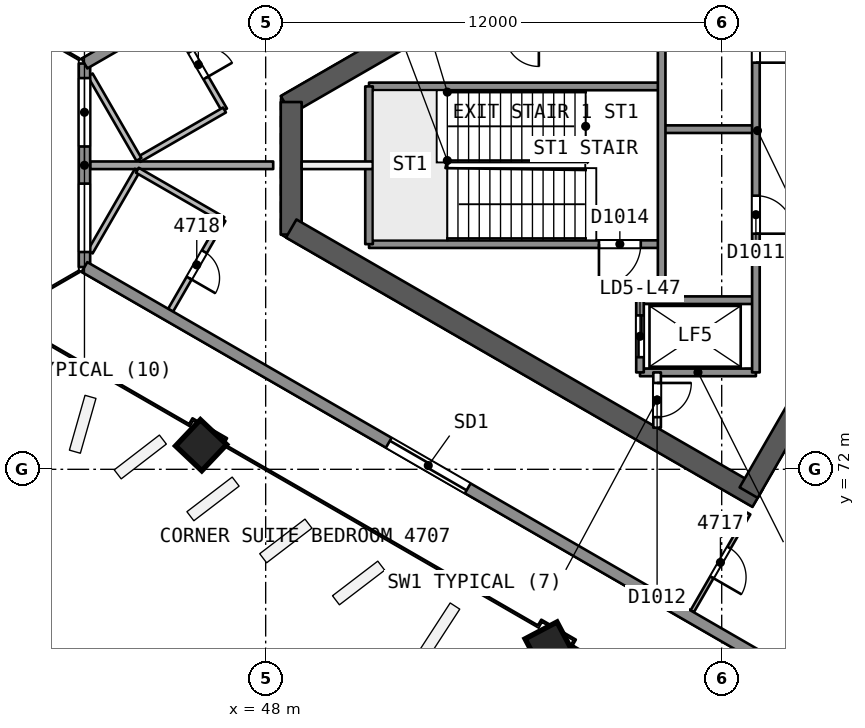
"""IFC4 building model, lengths in metres.
Left out: names, types, materials, properties, quantities, classifications, styles, units other than length and angle.
Written with IfcOpenShell. Run it as: python <this file> out.ifc"""

import sys

from ifc_helpers import new_model, si_unit, direction, frame, frame_2d, origin, origin_2d, place, context, subcontext, project, spatial, rectangle, extrude, element, fill, save


model = new_model("IFC4")
c1 = context("Model", 3, precision=1e-05, world=origin(), true_north=direction((0.0, 1.0)))
c2 = subcontext(c1, "Body", "Model", "MODEL_VIEW")
j1 = project(units=[si_unit("LENGTHUNIT", "METRE"), si_unit("PLANEANGLEUNIT", "RADIAN")], contexts=[c1])
p1 = place(None, origin())
s1 = spatial("IfcSite", under=j1, at=p1, CompositionType="ELEMENT")
p2 = place(p1, origin())
s2 = spatial("IfcBuilding", under=s1, at=p2, CompositionType="ELEMENT")
p3 = place(p2, frame((0.0, 0.0, 193.3)))
s3 = spatial("IfcBuildingStorey", under=s2, at=p3, CompositionType="ELEMENT", Elevation=193.3)
p4 = place(p3, frame((65.682, 80.0, 0.0), z_axis=(0.0, 0.0, 1.0), x_axis=(-0.500000202252, 0.866025287014, 0.0)))
e1 = element("IfcWall", 1, at=p4, inside=s3, PredefinedType="SHEAR", context=c2, shape_type="SweptSolid", body=[
    extrude(rectangle(XDim=10.221, YDim=0.55, at=frame_2d((5.111, 0.0))), origin(), (0.0, 0.0, 1.0), 3.7),
])
p5 = place(p4, frame((0.791, 0.0, 0.0)))
e2 = element("IfcOpeningElement", 2, at=p5, cuts=e1, PredefinedType="OPENING", context=c2, shape_type="SweptSolid", body=[
    extrude(rectangle(XDim=1.2, YDim=2.1, at=frame_2d((0.6, 1.05))), frame((0.0, 0.286, 0.0), z_axis=(0.0, -1.0, 0.0), x_axis=(1.0, 0.0, 0.0)), (0.0, 0.0, 1.0), 0.571),
])
p6 = place(p3, frame((60.709, 88.614, 0.0), z_axis=(0.0, 0.0, 1.0), x_axis=(-0.866020164116, -0.500009075263, 0.0)))
e3 = element("IfcWall", 3, at=p6, inside=s3, PredefinedType="SHEAR", context=c2, shape_type="SweptSolid", body=[
    extrude(rectangle(XDim=14.058, YDim=0.55, at=frame_2d((7.029, 0.0))), origin(), (0.0, 0.0, 1.0), 3.7),
])
p7 = place(p3, frame((48.672, 81.664, 0.0), z_axis=(0.0, 0.0, 1.0), x_axis=(0.0, -1.0, 0.0)))
e4 = element("IfcWall", 4, at=p7, inside=s3, PredefinedType="SHEAR", context=c2, shape_type="SweptSolid", body=[
    extrude(rectangle(XDim=3.487, YDim=0.55, at=frame_2d((1.743, 0.0))), origin(), (0.0, 0.0, 1.0), 3.7),
])
p8 = place(p3, frame((48.672, 78.336, 0.0), z_axis=(0.0, 0.0, 1.0), x_axis=(0.866023530946, -0.500003243837, 0.0)))
e5 = element("IfcWall", 5, at=p8, inside=s3, PredefinedType="SHEAR", context=c2, shape_type="SweptSolid", body=[
    extrude(rectangle(XDim=14.175, YDim=0.55, at=frame_2d((7.087, 0.0))), origin(), (0.0, 0.0, 1.0), 3.7),
])
p9 = place(p3, frame((60.709, 71.386, 0.0), z_axis=(0.0, 0.0, 1.0), x_axis=(0.500015938302, 0.866016201606, 0.0)))
e6 = element("IfcWall", 6, at=p9, inside=s3, PredefinedType="SHEAR", context=c2, shape_type="SweptSolid", body=[
    extrude(rectangle(XDim=10.105, YDim=0.55, at=frame_2d((5.053, 0.0))), origin(), (0.0, 0.0, 1.0), 3.7),
])
p10 = place(p9, frame((7.955, 0.0, 0.0)))
e7 = element("IfcOpeningElement", 7, at=p10, cuts=e6, PredefinedType="OPENING", context=c2, shape_type="SweptSolid", body=[
    extrude(rectangle(XDim=1.2, YDim=2.1, at=frame_2d((0.6, 1.05))), frame((0.0, 0.286, 0.0), z_axis=(0.0, -1.0, 0.0), x_axis=(1.0, 0.0, 0.0)), (0.0, 0.0, 1.0), 0.571),
])
p11 = place(p3, frame((46.266, 72.626, 0.0), z_axis=(0.02855911485, 0.006793507689, 0.999569019734), x_axis=(-0.865318766308, 0.500768301983, 0.021319953197)))
e8 = element("IfcColumn", 8, at=p11, inside=s3, PredefinedType="COLUMN", context=c2, shape_type="SweptSolid", body=[
    extrude(rectangle(XDim=0.95, YDim=0.95, at=origin_2d()), origin(), (0.0, 0.0, 1.0), 3.702),
])
p12 = place(p3, frame((55.445, 67.326, 0.0), z_axis=(0.019328501455, 0.012204002625, 0.999738701537), x_axis=(-0.866906106124, 0.498357109285, 0.010676834304)))
e9 = element("IfcColumn", 9, at=p12, inside=s3, PredefinedType="COLUMN", context=c2, shape_type="SweptSolid", body=[
    extrude(rectangle(XDim=0.95, YDim=0.95, at=origin_2d()), origin(), (0.0, 0.0, 1.0), 3.701),
])
p13 = place(p3, frame((45.54, 83.838, 0.0), z_axis=(0.0, 0.0, 1.0), x_axis=(0.499983500429, -0.866034929606, 0.0)))
e10 = element("IfcWall", 10, at=p13, inside=s3, PredefinedType="PARTITIONING", context=c2, shape_type="SweptSolid", body=[
    extrude(rectangle(XDim=2.752, YDim=0.15, at=frame_2d((1.376, 0.0))), origin(), (0.0, 0.0, 1.0), 3.3),
])
p14 = place(p13, frame((0.976, 0.0, 0.0)))
e11 = element("IfcOpeningElement", 11, at=p14, cuts=e10, PredefinedType="OPENING", context=c2, shape_type="SweptSolid", body=[
    extrude(rectangle(XDim=0.8, YDim=2.1, at=frame_2d((0.4, 1.05))), frame((0.0, 0.085, 0.0), z_axis=(0.0, -1.0, 0.0), x_axis=(1.0, 0.0, 0.0)), (0.0, 0.0, 1.0), 0.171),
])
p15 = place(p3, frame((46.916, 81.454, 0.0), z_axis=(0.0, 0.0, 1.0), x_axis=(-0.866021400173, -0.500006934395, 0.0)))
e12 = element("IfcWall", 12, at=p15, inside=s3, PredefinedType="PARTITIONING", context=c2, shape_type="SweptSolid", body=[
    extrude(rectangle(XDim=2.6, YDim=0.15, at=frame_2d((1.3, 0.0))), origin(), (0.0, 0.0, 1.0), 3.3),
])
p16 = place(p3, frame((44.664, 80.154, 0.0), z_axis=(0.0, 0.0, 1.0), x_axis=(-0.49996389635, 0.866046247233, 0.0)))
e13 = element("IfcWall", 13, at=p16, inside=s3, PredefinedType="PARTITIONING", context=c2, shape_type="SweptSolid", body=[
    extrude(rectangle(XDim=2.568, YDim=0.15, at=frame_2d((1.284, 0.0))), origin(), (0.0, 0.0, 1.0), 3.3),
])
p17 = place(p3, frame((43.381, 80.0, 0.0), z_axis=(0.0, 0.0, 1.0), x_axis=(1.0, 0.0, 0.0)))
e14 = element("IfcWall", 14, at=p17, inside=s3, PredefinedType="PARTITIONING", context=c2, shape_type="SweptSolid", body=[
    extrude(rectangle(XDim=4.817, YDim=0.2, at=frame_2d((2.409, 0.0))), origin(), (0.0, 0.0, 1.0), 3.3),
])
p18 = place(p3, frame((60.71, 70.838, 0.0), z_axis=(0.0, 0.0, 1.0), x_axis=(-0.49997816789, -0.866038008192, 0.0)))
e15 = element("IfcWall", 15, at=p18, inside=s3, PredefinedType="PARTITIONING", context=c2, shape_type="SweptSolid", body=[
    extrude(rectangle(XDim=2.975, YDim=0.1, at=frame_2d((1.488, 0.0))), origin(), (0.0, 0.0, 1.0), 3.3),
])
p19 = place(p18, frame((1.038, 0.0, 0.0)))
e16 = element("IfcOpeningElement", 16, at=p19, cuts=e15, PredefinedType="OPENING", context=c2, shape_type="SweptSolid", body=[
    extrude(rectangle(XDim=0.9, YDim=2.1, at=frame_2d((0.45, 1.05))), frame((0.0, 0.061, 0.0), z_axis=(0.0, -1.0, 0.0), x_axis=(1.0, 0.0, 0.0)), (0.0, 0.0, 1.0), 0.121),
])
p20 = place(p3, frame((43.381, 77.718, 0.0), z_axis=(0.0, 0.0, 1.0), x_axis=(0.499943602543, 0.866057962423, 0.0)))
e17 = element("IfcWall", 17, at=p20, inside=s3, PredefinedType="PARTITIONING", context=c2, shape_type="SweptSolid", body=[
    extrude(rectangle(XDim=2.485, YDim=0.15, at=frame_2d((1.242, 0.0))), origin(), (0.0, 0.0, 1.0), 3.3),
])
p21 = place(p3, frame((44.623, 79.87, 0.0), z_axis=(0.0, 0.0, 1.0), x_axis=(0.866021400173, -0.500006934395, 0.0)))
e18 = element("IfcWall", 18, at=p21, inside=s3, PredefinedType="PARTITIONING", context=c2, shape_type="SweptSolid", body=[
    extrude(rectangle(XDim=2.6, YDim=0.15, at=frame_2d((1.3, 0.0))), origin(), (0.0, 0.0, 1.0), 3.3),
])
p22 = place(p3, frame((46.875, 78.57, 0.0), z_axis=(0.0, 0.0, 1.0), x_axis=(-0.499983500429, -0.866034929606, 0.0)))
e19 = element("IfcWall", 19, at=p22, inside=s3, PredefinedType="PARTITIONING", context=c2, shape_type="SweptSolid", body=[
    extrude(rectangle(XDim=2.752, YDim=0.15, at=frame_2d((1.376, 0.0))), origin(), (0.0, 0.0, 1.0), 3.3),
])
p23 = place(p22, frame((0.976, 0.0, 0.0)))
e20 = element("IfcOpeningElement", 20, at=p23, cuts=e19, PredefinedType="OPENING", context=c2, shape_type="SweptSolid", body=[
    extrude(rectangle(XDim=0.8, YDim=2.1, at=frame_2d((0.4, 1.05))), frame((0.0, 0.085, 0.0), z_axis=(0.0, -1.0, 0.0), x_axis=(1.0, 0.0, 0.0)), (0.0, 0.0, 1.0), 0.171),
])
p24 = place(p3, frame((43.232, 77.322, 0.0), z_axis=(0.0, 0.0, 1.0), x_axis=(0.0, 1.0, 0.0)))
e21 = element("IfcWall", 21, at=p24, inside=s3, PredefinedType="SOLIDWALL", context=c2, shape_type="SweptSolid", body=[
    extrude(rectangle(XDim=5.355, YDim=0.3, at=frame_2d((2.678, 0.0))), origin(), (0.0, 0.0, 1.0), 3.3),
])
p25 = place(p24, frame((3.172, 0.0, 0.9)))
e22 = element("IfcOpeningElement", 22, at=p25, cuts=e21, PredefinedType="OPENING", context=c2, shape_type="SweptSolid", body=[
    extrude(rectangle(XDim=1.8, YDim=1.5, at=frame_2d((0.9, 0.75))), frame((0.0, 0.161, 0.0), z_axis=(0.0, -1.0, 0.0), x_axis=(1.0, 0.0, 0.0)), (0.0, 0.0, 1.0), 0.321),
])
p26 = place(p24, frame((0.395, 0.0, 0.9)))
e23 = element("IfcOpeningElement", 23, at=p26, cuts=e21, PredefinedType="OPENING", context=c2, shape_type="SweptSolid", body=[
    extrude(rectangle(XDim=1.8, YDim=1.5, at=frame_2d((0.9, 0.75))), frame((0.0, 0.161, 0.0), z_axis=(0.0, -1.0, 0.0), x_axis=(1.0, 0.0, 0.0)), (0.0, 0.0, 1.0), 0.321),
])
p27 = place(p3, frame((43.232, 82.678, 0.0), z_axis=(0.0, 0.0, 1.0), x_axis=(0.866025125259, 0.500000482419, 0.0)))
e24 = element("IfcWall", 24, at=p27, inside=s3, PredefinedType="SOLIDWALL", context=c2, shape_type="SweptSolid", body=[
    extrude(rectangle(XDim=52.347, YDim=0.3, at=frame_2d((26.173, 0.0))), origin(), (0.0, 0.0, 1.0), 3.3),
])
p28 = place(p27, frame((31.209, 0.0, 0.0)))
e25 = element("IfcOpeningElement", 25, at=p28, cuts=e24, PredefinedType="OPENING", context=c2, shape_type="SweptSolid", body=[
    extrude(rectangle(XDim=2.4, YDim=2.4, at=frame_2d((1.2, 1.2))), frame((0.0, 0.161, 0.0), z_axis=(0.0, -1.0, 0.0), x_axis=(1.0, 0.0, 0.0)), (0.0, 0.0, 1.0), 0.321),
])
p29 = place(p27, frame((40.7, 0.0, 0.0)))
e26 = element("IfcOpeningElement", 26, at=p29, cuts=e24, PredefinedType="OPENING", context=c2, shape_type="SweptSolid", body=[
    extrude(rectangle(XDim=2.4, YDim=2.4, at=frame_2d((1.2, 1.2))), frame((0.0, 0.161, 0.0), z_axis=(0.0, -1.0, 0.0), x_axis=(1.0, 0.0, 0.0)), (0.0, 0.0, 1.0), 0.321),
])
p30 = place(p27, frame((19.517, 0.0, 0.0)))
e27 = element("IfcOpeningElement", 27, at=p30, cuts=e24, PredefinedType="OPENING", context=c2, shape_type="SweptSolid", body=[
    extrude(rectangle(XDim=2.4, YDim=2.4, at=frame_2d((1.2, 1.2))), frame((0.0, 0.161, 0.0), z_axis=(0.0, -1.0, 0.0), x_axis=(1.0, 0.0, 0.0)), (0.0, 0.0, 1.0), 0.321),
])
p31 = place(p27, frame((9.27, 0.0, 0.0)))
e28 = element("IfcOpeningElement", 28, at=p31, cuts=e24, PredefinedType="OPENING", context=c2, shape_type="SweptSolid", body=[
    extrude(rectangle(XDim=2.4, YDim=2.4, at=frame_2d((1.2, 1.2))), frame((0.0, 0.161, 0.0), z_axis=(0.0, -1.0, 0.0), x_axis=(1.0, 0.0, 0.0)), (0.0, 0.0, 1.0), 0.321),
])
p32 = place(p27, frame((28.001, 0.0, 0.9)))
e29 = element("IfcOpeningElement", 29, at=p32, cuts=e24, PredefinedType="OPENING", context=c2, shape_type="SweptSolid", body=[
    extrude(rectangle(XDim=1.8, YDim=1.5, at=frame_2d((0.9, 0.75))), frame((0.0, 0.161, 0.0), z_axis=(0.0, -1.0, 0.0), x_axis=(1.0, 0.0, 0.0)), (0.0, 0.0, 1.0), 0.321),
])
p33 = place(p27, frame((24.104, 0.0, 0.9)))
e30 = element("IfcOpeningElement", 30, at=p33, cuts=e24, PredefinedType="OPENING", context=c2, shape_type="SweptSolid", body=[
    extrude(rectangle(XDim=1.8, YDim=1.5, at=frame_2d((0.9, 0.75))), frame((0.0, 0.161, 0.0), z_axis=(0.0, -1.0, 0.0), x_axis=(1.0, 0.0, 0.0)), (0.0, 0.0, 1.0), 0.321),
])
p34 = place(p3, frame((88.565, 51.149, 0.0), z_axis=(0.0, 0.0, 1.0), x_axis=(-0.866025125259, 0.500000482419, 0.0)))
e31 = element("IfcWall", 31, at=p34, inside=s3, PredefinedType="SOLIDWALL", context=c2, shape_type="SweptSolid", body=[
    extrude(rectangle(XDim=52.347, YDim=0.3, at=frame_2d((26.173, 0.0))), origin(), (0.0, 0.0, 1.0), 3.3),
])
p35 = place(p34, frame((29.26, 0.0, 0.0)))
e32 = element("IfcOpeningElement", 32, at=p35, cuts=e31, PredefinedType="OPENING", context=c2, shape_type="SweptSolid", body=[
    extrude(rectangle(XDim=2.4, YDim=2.4, at=frame_2d((1.2, 1.2))), frame((0.0, 0.161, 0.0), z_axis=(0.0, -1.0, 0.0), x_axis=(1.0, 0.0, 0.0)), (0.0, 0.0, 1.0), 0.321),
])
p36 = place(p34, frame((40.7, 0.0, 0.0)))
e33 = element("IfcOpeningElement", 33, at=p36, cuts=e31, PredefinedType="OPENING", context=c2, shape_type="SweptSolid", body=[
    extrude(rectangle(XDim=2.4, YDim=2.4, at=frame_2d((1.2, 1.2))), frame((0.0, 0.161, 0.0), z_axis=(0.0, -1.0, 0.0), x_axis=(1.0, 0.0, 0.0)), (0.0, 0.0, 1.0), 0.321),
])
p37 = place(p34, frame((19.517, 0.0, 0.0)))
e34 = element("IfcOpeningElement", 34, at=p37, cuts=e31, PredefinedType="OPENING", context=c2, shape_type="SweptSolid", body=[
    extrude(rectangle(XDim=2.4, YDim=2.4, at=frame_2d((1.2, 1.2))), frame((0.0, 0.161, 0.0), z_axis=(0.0, -1.0, 0.0), x_axis=(1.0, 0.0, 0.0)), (0.0, 0.0, 1.0), 0.321),
])
p38 = place(p34, frame((9.27, 0.0, 0.0)))
e35 = element("IfcOpeningElement", 35, at=p38, cuts=e31, PredefinedType="OPENING", context=c2, shape_type="SweptSolid", body=[
    extrude(rectangle(XDim=2.4, YDim=2.4, at=frame_2d((1.2, 1.2))), frame((0.0, 0.161, 0.0), z_axis=(0.0, -1.0, 0.0), x_axis=(1.0, 0.0, 0.0)), (0.0, 0.0, 1.0), 0.321),
])
p39 = place(p34, frame((24.104, 0.0, 0.9)))
e36 = element("IfcOpeningElement", 36, at=p39, cuts=e31, PredefinedType="OPENING", context=c2, shape_type="SweptSolid", body=[
    extrude(rectangle(XDim=1.8, YDim=1.5, at=frame_2d((0.9, 0.75))), frame((0.0, 0.161, 0.0), z_axis=(0.0, -1.0, 0.0), x_axis=(1.0, 0.0, 0.0)), (0.0, 0.0, 1.0), 0.321),
])
p40 = place(p3, frame((58.42, 82.075, 0.0), z_axis=(0.0, 0.0, 1.0), x_axis=(-1.0, 0.0, 0.0)))
e37 = element("IfcWall", 37, at=p40, inside=s3, PredefinedType="SOLIDWALL", context=c2, shape_type="SweptSolid", body=[
    extrude(rectangle(XDim=7.7, YDim=0.2, at=frame_2d((3.85, 0.0))), origin(), (0.0, 0.0, 1.0), 3.3),
])
p41 = place(p3, frame((60.9, 80.95, 0.0), z_axis=(0.0, 0.0, 1.0), x_axis=(-1.0, 0.0, 0.0)))
e38 = element("IfcWall", 38, at=p41, inside=s3, PredefinedType="SOLIDWALL", context=c2, shape_type="SweptSolid", body=[
    extrude(rectangle(XDim=2.48, YDim=0.2, at=frame_2d((1.24, 0.0))), origin(), (0.0, 0.0, 1.0), 3.3),
])
p42 = place(p3, frame((50.82, 80.0, 0.0), z_axis=(0.0, 0.0, 1.0), x_axis=(-1.0, 0.0, 0.0)))
e39 = element("IfcWall", 39, at=p42, inside=s3, PredefinedType="PARTITIONING", context=c2, shape_type="SweptSolid", body=[
    extrude(rectangle(XDim=1.873, YDim=0.2, at=frame_2d((0.937, 0.0))), origin(), (0.0, 0.0, 1.0), 3.3),
])
p43 = place(p3, frame((58.42, 77.925, 0.0), z_axis=(0.0, 0.0, 1.0), x_axis=(-1.0, 0.0, 0.0)))
e40 = element("IfcWall", 40, at=p43, inside=s3, PredefinedType="SOLIDWALL", context=c2, shape_type="SweptSolid", body=[
    extrude(rectangle(XDim=7.7, YDim=0.2, at=frame_2d((3.85, 0.0))), origin(), (0.0, 0.0, 1.0), 3.3),
])
p44 = place(p43, frame((0.55, 0.0, 0.0)))
e41 = element("IfcOpeningElement", 41, at=p44, cuts=e40, PredefinedType="OPENING", context=c2, shape_type="SweptSolid", body=[
    extrude(rectangle(XDim=1.1, YDim=2.1, at=frame_2d((0.55, 1.05))), frame((0.0, 0.11, 0.0), z_axis=(0.0, -1.0, 0.0), x_axis=(1.0, 0.0, 0.0)), (0.0, 0.0, 1.0), 0.221),
])
for number, where, z_axis, x_axis in (
    (42, (60.9, 76.45, 0.0), (0.0, 0.0, 1.0), (-1.0, 0.0, 0.0)),
    (43, (60.9, 74.55, 0.0), (0.0, 0.0, 1.0), (-1.0, 0.0, 0.0)),
):
    element("IfcWall", number, at=place(p3, frame(where, z_axis=z_axis, x_axis=x_axis)), inside=s3, PredefinedType="SOLIDWALL", context=c2, shape_type="SweptSolid", body=[
        extrude(rectangle(XDim=3.05, YDim=0.2, at=frame_2d((1.525, 0.0))), origin(), (0.0, 0.0, 1.0), 3.3),
    ])
p45 = place(p3, frame((60.9, 85.45, 0.0), z_axis=(0.0, 0.0, 1.0), x_axis=(0.0, -1.0, 0.0)))
e44 = element("IfcWall", 44, at=p45, inside=s3, PredefinedType="SOLIDWALL", context=c2, shape_type="SweptSolid", body=[
    extrude(rectangle(XDim=10.9, YDim=0.2, at=frame_2d((5.45, 0.0))), origin(), (0.0, 0.0, 1.0), 3.3),
])
p46 = place(p45, frame((1.75, 0.0, 0.0)))
e45 = element("IfcOpeningElement", 45, at=p46, cuts=e44, PredefinedType="OPENING", context=c2, shape_type="SweptSolid", body=[
    extrude(rectangle(XDim=1.0, YDim=2.1, at=frame_2d((0.5, 1.05))), frame((0.0, 0.11, 0.0), z_axis=(0.0, -1.0, 0.0), x_axis=(1.0, 0.0, 0.0)), (0.0, 0.0, 1.0), 0.221),
])
p47 = place(p45, frame((6.25, 0.0, 0.0)))
e46 = element("IfcOpeningElement", 46, at=p47, cuts=e44, PredefinedType="OPENING", context=c2, shape_type="SweptSolid", body=[
    extrude(rectangle(XDim=1.0, YDim=2.1, at=frame_2d((0.5, 1.05))), frame((0.0, 0.11, 0.0), z_axis=(0.0, -1.0, 0.0), x_axis=(1.0, 0.0, 0.0)), (0.0, 0.0, 1.0), 0.221),
])
p48 = place(p3, frame((58.42, 86.974, 0.0), z_axis=(0.0, 0.0, 1.0), x_axis=(0.0, -1.0, 0.0)))
e47 = element("IfcWall", 47, at=p48, inside=s3, PredefinedType="SOLIDWALL", context=c2, shape_type="SweptSolid", body=[
    extrude(rectangle(XDim=10.524, YDim=0.2, at=frame_2d((5.262, 0.0))), origin(), (0.0, 0.0, 1.0), 3.3),
])
p49 = place(p48, frame((0.312, 0.0, 0.0)))
e48 = element("IfcOpeningElement", 48, at=p49, cuts=e47, PredefinedType="OPENING", context=c2, shape_type="SweptSolid", body=[
    extrude(rectangle(XDim=0.9, YDim=2.1, at=frame_2d((0.45, 1.05))), frame((0.0, 0.11, 0.0), z_axis=(0.0, -1.0, 0.0), x_axis=(1.0, 0.0, 0.0)), (0.0, 0.0, 1.0), 0.221),
])
p50 = place(p3, frame((58.3, 74.55, 0.0), z_axis=(0.0, 0.0, 1.0), x_axis=(0.0, -1.0, 0.0)))
e49 = element("IfcWall", 49, at=p50, inside=s3, PredefinedType="PARTITIONING", context=c2, shape_type="SweptSolid", body=[
    extrude(rectangle(XDim=1.455, YDim=0.2, at=frame_2d((0.728, 0.0))), origin(), (0.0, 0.0, 1.0), 3.3),
])
p51 = place(p50, frame((0.278, 0.0, 0.0)))
e50 = element("IfcOpeningElement", 50, at=p51, cuts=e49, PredefinedType="OPENING", context=c2, shape_type="SweptSolid", body=[
    extrude(rectangle(XDim=0.9, YDim=2.1, at=frame_2d((0.45, 1.05))), frame((0.0, 0.11, 0.0), z_axis=(0.0, -1.0, 0.0), x_axis=(1.0, 0.0, 0.0)), (0.0, 0.0, 1.0), 0.221),
])
p52 = place(p3, frame((57.85, 76.45, 0.0), z_axis=(0.0, 0.0, 1.0), x_axis=(0.0, -1.0, 0.0)))
e51 = element("IfcWall", 51, at=p52, inside=s3, PredefinedType="SOLIDWALL", context=c2, shape_type="SweptSolid", body=[
    extrude(rectangle(XDim=1.9, YDim=0.2, at=frame_2d((0.95, 0.0))), origin(), (0.0, 0.0, 1.0), 3.3),
])
p53 = place(p52, frame((0.4, 0.0, 0.0)))
e52 = element("IfcOpeningElement", 52, at=p53, cuts=e51, PredefinedType="OPENING", context=c2, shape_type="SweptSolid", body=[
    extrude(rectangle(XDim=1.1, YDim=2.1, at=frame_2d((0.55, 1.05))), frame((0.0, 0.11, 0.0), z_axis=(0.0, -1.0, 0.0), x_axis=(1.0, 0.0, 0.0)), (0.0, 0.0, 1.0), 0.221),
])
p54 = place(p3, frame((50.72, 82.075, 0.0), z_axis=(0.0, 0.0, 1.0), x_axis=(0.0, -1.0, 0.0)))
e53 = element("IfcWall", 53, at=p54, inside=s3, PredefinedType="SOLIDWALL", context=c2, shape_type="SweptSolid", body=[
    extrude(rectangle(XDim=4.15, YDim=0.2, at=frame_2d((2.075, 0.0))), origin(), (0.0, 0.0, 1.0), 3.3),
])
p55 = place(p14, origin())
e54 = element("IfcDoor", 54, at=p55, inside=s3, OperationType="SINGLE_SWING_RIGHT", PredefinedType="NOTDEFINED", context=c2, shape_type="SweptSolid", body=[
    extrude(rectangle(XDim=0.8, YDim=2.1, at=frame_2d((0.4, 1.05))), frame((0.0, 0.025, 0.0), z_axis=(0.0, -1.0, 0.0), x_axis=(1.0, 0.0, 0.0)), (0.0, 0.0, 1.0), 0.05),
])
fill(e11, e54)
p56 = place(p19, origin())
e55 = element("IfcDoor", 55, at=p56, inside=s3, OperationType="SINGLE_SWING_RIGHT", PredefinedType="NOTDEFINED", context=c2, shape_type="SweptSolid", body=[
    extrude(rectangle(XDim=0.9, YDim=2.1, at=frame_2d((0.45, 1.05))), frame((0.0, 0.025, 0.0), z_axis=(0.0, -1.0, 0.0), x_axis=(1.0, 0.0, 0.0)), (0.0, 0.0, 1.0), 0.05),
])
fill(e16, e55)
p57 = place(p23, origin())
e56 = element("IfcDoor", 56, at=p57, inside=s3, OperationType="SINGLE_SWING_RIGHT", PredefinedType="NOTDEFINED", context=c2, shape_type="SweptSolid", body=[
    extrude(rectangle(XDim=0.8, YDim=2.1, at=frame_2d((0.4, 1.05))), frame((0.0, 0.025, 0.0), z_axis=(0.0, -1.0, 0.0), x_axis=(1.0, 0.0, 0.0)), (0.0, 0.0, 1.0), 0.05),
])
fill(e20, e56)
p58 = place(p25, origin())
e57 = element("IfcWindow", 57, at=p58, inside=s3, PartitioningType="SINGLE_PANEL", PredefinedType="WINDOW", context=c2, shape_type="SweptSolid", body=[
    extrude(rectangle(XDim=1.8, YDim=1.5, at=frame_2d((0.9, 0.75))), frame((0.0, 0.03, 0.0), z_axis=(0.0, -1.0, 0.0), x_axis=(1.0, 0.0, 0.0)), (0.0, 0.0, 1.0), 0.06),
])
fill(e22, e57)
p59 = place(p26, origin())
e58 = element("IfcWindow", 58, at=p59, inside=s3, PartitioningType="SINGLE_PANEL", PredefinedType="WINDOW", context=c2, shape_type="SweptSolid", body=[
    extrude(rectangle(XDim=1.8, YDim=1.5, at=frame_2d((0.9, 0.75))), frame((0.0, 0.03, 0.0), z_axis=(0.0, -1.0, 0.0), x_axis=(1.0, 0.0, 0.0)), (0.0, 0.0, 1.0), 0.06),
])
fill(e23, e58)
p60 = place(p36, origin())
e59 = element("IfcDoor", 59, at=p60, inside=s3, OperationType="SLIDING_TO_RIGHT", PredefinedType="NOTDEFINED", context=c2, shape_type="SweptSolid", body=[
    extrude(rectangle(XDim=2.4, YDim=2.4, at=frame_2d((1.2, 1.2))), frame((0.0, 0.025, 0.0), z_axis=(0.0, -1.0, 0.0), x_axis=(1.0, 0.0, 0.0)), (0.0, 0.0, 1.0), 0.05),
])
fill(e33, e59)
p61 = place(p53, origin())
e60 = element("IfcDoor", 60, at=p61, inside=s3, OperationType="SLIDING_TO_RIGHT", PredefinedType="NOTDEFINED", context=c2, shape_type="SweptSolid", body=[
    extrude(rectangle(XDim=1.1, YDim=2.1, at=frame_2d((0.55, 1.05))), frame((0.0, 0.025, 0.0), z_axis=(0.0, -1.0, 0.0), x_axis=(1.0, 0.0, 0.0)), (0.0, 0.0, 1.0), 0.05),
])
fill(e52, e60)
p62 = place(p46, origin())
e61 = element("IfcDoor", 61, at=p62, inside=s3, OperationType="SINGLE_SWING_RIGHT", PredefinedType="NOTDEFINED", context=c2, shape_type="SweptSolid", body=[
    extrude(rectangle(XDim=1.0, YDim=2.1, at=frame_2d((0.5, 1.05))), frame((0.0, 0.025, 0.0), z_axis=(0.0, -1.0, 0.0), x_axis=(1.0, 0.0, 0.0)), (0.0, 0.0, 1.0), 0.05),
])
fill(e45, e61)
p63 = place(p47, origin())
e62 = element("IfcDoor", 62, at=p63, inside=s3, OperationType="SINGLE_SWING_RIGHT", PredefinedType="NOTDEFINED", context=c2, shape_type="SweptSolid", body=[
    extrude(rectangle(XDim=1.0, YDim=2.1, at=frame_2d((0.5, 1.05))), frame((0.0, 0.025, 0.0), z_axis=(0.0, -1.0, 0.0), x_axis=(1.0, 0.0, 0.0)), (0.0, 0.0, 1.0), 0.05),
])
fill(e46, e62)
p64 = place(p51, origin())
e63 = element("IfcDoor", 63, at=p64, inside=s3, OperationType="SINGLE_SWING_LEFT", PredefinedType="NOTDEFINED", context=c2, shape_type="SweptSolid", body=[
    extrude(rectangle(XDim=0.9, YDim=2.1, at=frame_2d((0.45, 1.05))), frame((0.0, 0.025, 0.0), z_axis=(0.0, -1.0, 0.0), x_axis=(1.0, 0.0, 0.0)), (0.0, 0.0, 1.0), 0.05),
])
fill(e50, e63)
p65 = place(p44, origin())
e64 = element("IfcDoor", 64, at=p65, inside=s3, OperationType="SINGLE_SWING_RIGHT", PredefinedType="NOTDEFINED", context=c2, shape_type="SweptSolid", body=[
    extrude(rectangle(XDim=1.1, YDim=2.1, at=frame_2d((0.55, 1.05))), frame((0.0, 0.025, 0.0), z_axis=(0.0, -1.0, 0.0), x_axis=(1.0, 0.0, 0.0)), (0.0, 0.0, 1.0), 0.05),
])
fill(e41, e64)
save(model, sys.argv[1])
